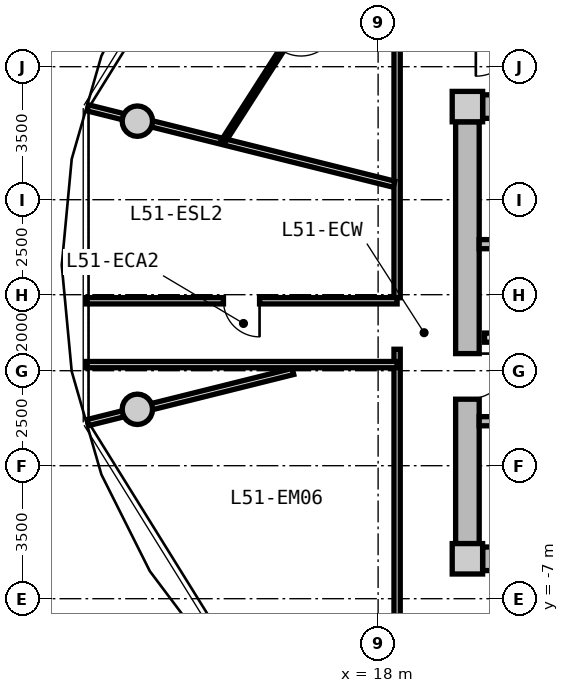
"""IFC4 building model, lengths in metres.
Left out: names, types, materials, properties, quantities, classifications, styles, units other than length and angle.
Written with IfcOpenShell. Run it as: python <this file> out.ifc"""

import sys

from ifc_helpers import new_model, si_unit, direction, frame, frame_2d, origin, origin_2d, place, context, subcontext, project, spatial, rectangle, circle, extrude, source, transform, mapped, element, fill, save


model = new_model("IFC4")
c1 = context("Model", 3, precision=1e-05, world=origin(), true_north=direction((0.0, 1.0)))
c2 = subcontext(c1, "Body", "Model", "MODEL_VIEW")
j1 = project(units=[si_unit("LENGTHUNIT", "METRE"), si_unit("PLANEANGLEUNIT", "RADIAN")], contexts=[c1])
p1 = place(None, origin())
s1 = spatial("IfcSite", under=j1, at=p1, CompositionType="ELEMENT")
p2 = place(p1, origin())
s2 = spatial("IfcBuilding", under=s1, at=p2, CompositionType="ELEMENT")
p3 = place(p2, frame((0.0, 0.0, 164.8)))
s3 = spatial("IfcBuildingStorey", under=s2, at=p3, CompositionType="ELEMENT", Elevation=164.8)
m1 = source(origin(), c2, "Body", "SweptSolid", [
    extrude(rectangle(XDim=0.8, YDim=0.8, at=origin_2d()), origin(), (0.0, 0.0, 1.0), 3.05),
])
for number, where, z_axis, x_axis in (
    (1, (20.35, -5.95, 0.0), (0.0, 0.0, 1.0), (1.0, 0.0, 0.0)),
    (2, (20.35, 5.95, 0.0), (0.0, 0.0, 1.0), (1.0, 0.0, 0.0)),
):
    element("IfcColumn", number, at=place(p3, frame(where, z_axis=z_axis, x_axis=x_axis)), inside=s3, PredefinedType="COLUMN", context=c2, shape_type="MappedRepresentation", body=[
        mapped(m1, transform((0.0, 0.0, 0.0), x_axis=(1.0, 0.0, 0.0), y_axis=(0.0, 1.0, 0.0), z_axis=(0.0, 0.0, 1.0), scale=1.0)),
    ])
m2 = source(origin(), c2, "Body", "SweptSolid", [
    extrude(rectangle(XDim=14.5, YDim=0.62, at=frame_2d((7.25, 0.0))), origin(), (0.0, 0.0, 1.0), 2.81),
])
for number, where, z_axis, x_axis in (
    (3, (20.75, 5.95, 0.0), (0.0, 0.0, 1.0), (1.0, 0.0, 0.0)),
    (4, (35.25, -5.95, 0.0), (0.0, 0.0, 1.0), (-1.0, 0.0, 0.0)),
):
    element("IfcWall", number, at=place(p3, frame(where, z_axis=z_axis, x_axis=x_axis)), inside=s3, PredefinedType="SHEAR", context=c2, shape_type="MappedRepresentation", body=[
        mapped(m2, transform((0.0, 0.0, 0.0), x_axis=(1.0, 0.0, 0.0), y_axis=(0.0, 1.0, 0.0), z_axis=(0.0, 0.0, 1.0), scale=1.0)),
    ])
m3 = source(origin(), c2, "Body", "SweptSolid", [
    extrude(rectangle(XDim=11.1, YDim=0.62, at=frame_2d((5.55, 0.0))), origin(), (0.0, 0.0, 1.0), 2.81),
])
p4 = place(p3, frame((20.35, -5.55, 0.0), z_axis=(0.0, 0.0, 1.0), x_axis=(0.0, 1.0, 0.0)))
e5 = element("IfcWall", 5, at=p4, inside=s3, PredefinedType="SHEAR", context=c2, shape_type="MappedRepresentation", body=[
    mapped(m3, transform((0.0, 0.0, 0.0), x_axis=(1.0, 0.0, 0.0), y_axis=(0.0, 1.0, 0.0), z_axis=(0.0, 0.0, 1.0), scale=1.0)),
])
p5 = place(p4, frame((3.8, 0.0, 0.0)))
e6 = element("IfcOpeningElement", 6, at=p5, cuts=e5, PredefinedType="OPENING", context=c2, shape_type="SweptSolid", body=[
    extrude(rectangle(XDim=1.2, YDim=2.15, at=frame_2d((0.6, 1.075))), frame((0.0, 0.32, 0.0), z_axis=(0.0, -1.0, 0.0), x_axis=(1.0, 0.0, 0.0)), (0.0, 0.0, 1.0), 0.64),
])
m4 = source(origin(), c2, "Body", "SweptSolid", [
    extrude(circle(Radius=0.4, at=origin_2d()), origin(), (0.0, 0.0, 1.0), 3.05),
])
for number, where, z_axis, x_axis in (
    (7, (11.665, 5.567, 0.0), (0.0, 0.0, 1.0), (1.0, 0.0, 0.0)),
    (8, (11.665, -2.016, 0.0), (0.0, 0.0, 1.0), (1.0, 0.0, 0.0)),
):
    element("IfcColumn", number, at=place(p3, frame(where, z_axis=z_axis, x_axis=x_axis)), inside=s3, PredefinedType="COLUMN", context=c2, shape_type="MappedRepresentation", body=[
        mapped(m4, transform((0.0, 0.0, 0.0), x_axis=(1.0, 0.0, 0.0), y_axis=(0.0, 1.0, 0.0), z_axis=(0.0, 0.0, 1.0), scale=1.0)),
    ])
m5 = source(origin(), c2, "Body", "SweptSolid", [
    extrude(rectangle(XDim=7.88, YDim=0.24, at=frame_2d((3.94, 0.0))), origin(), (0.0, 0.0, 1.0), 2.81),
])
p6 = place(p3, frame((20.66, 2.33, 0.0), z_axis=(0.0, 0.0, 1.0), x_axis=(1.0, 0.0, 0.0)))
e9 = element("IfcWall", 9, at=p6, inside=s3, PredefinedType="PARTITIONING", context=c2, shape_type="MappedRepresentation", body=[
    mapped(m5, transform((0.0, 0.0, 0.0), x_axis=(1.0, 0.0, 0.0), y_axis=(0.0, 1.0, 0.0), z_axis=(0.0, 0.0, 1.0), scale=1.0)),
])
p7 = place(p3, frame((20.66, -2.33, 0.0), z_axis=(0.0, 0.0, 1.0), x_axis=(1.0, 0.0, 0.0)))
e10 = element("IfcWall", 10, at=p7, inside=s3, PredefinedType="PARTITIONING", context=c2, shape_type="MappedRepresentation", body=[
    mapped(m5, transform((0.0, 0.0, 0.0), x_axis=(1.0, 0.0, 0.0), y_axis=(0.0, 1.0, 0.0), z_axis=(0.0, 0.0, 1.0), scale=1.0)),
])
p8 = place(p7, frame((1.0, 0.0, 0.0)))
e11 = element("IfcOpeningElement", 11, at=p8, cuts=e10, PredefinedType="OPENING", context=c2, shape_type="SweptSolid", body=[
    extrude(rectangle(XDim=1.1, YDim=2.15, at=frame_2d((0.55, 1.075))), frame((0.0, 0.13, 0.0), z_axis=(0.0, -1.0, 0.0), x_axis=(1.0, 0.0, 0.0)), (0.0, 0.0, 1.0), 0.26),
])
m6 = source(origin(), c2, "Body", "SweptSolid", [
    extrude(rectangle(XDim=7.62, YDim=0.24, at=frame_2d((3.81, 0.0))), origin(), (0.0, 0.0, 1.0), 2.795),
])
p9 = place(p3, frame((20.8, -0.13, 0.0), z_axis=(0.0, 0.0, 1.0), x_axis=(1.0, 0.0, 0.0)))
e12 = element("IfcWall", 12, at=p9, inside=s3, PredefinedType="PARTITIONING", context=c2, shape_type="MappedRepresentation", body=[
    mapped(m6, transform((0.0, 0.0, 0.0), x_axis=(1.0, 0.0, 0.0), y_axis=(0.0, 1.0, 0.0), z_axis=(0.0, 0.0, 1.0), scale=1.0)),
])
p10 = place(p9, frame((6.22, 0.0, 0.0)))
e13 = element("IfcOpeningElement", 13, at=p10, cuts=e12, PredefinedType="OPENING", context=c2, shape_type="SweptSolid", body=[
    extrude(rectangle(XDim=1.0, YDim=2.1, at=frame_2d((0.5, 1.05))), frame((0.0, 0.13, 0.0), z_axis=(0.0, -1.0, 0.0), x_axis=(1.0, 0.0, 0.0)), (0.0, 0.0, 1.0), 0.26),
])
p11 = place(p9, frame((2.4, 0.0, 0.0)))
e14 = element("IfcOpeningElement", 14, at=p11, cuts=e12, PredefinedType="OPENING", context=c2, shape_type="SweptSolid", body=[
    extrude(rectangle(XDim=1.0, YDim=2.1, at=frame_2d((0.5, 1.05))), frame((0.0, 0.13, 0.0), z_axis=(0.0, -1.0, 0.0), x_axis=(1.0, 0.0, 0.0)), (0.0, 0.0, 1.0), 0.26),
])
m7 = source(origin(), c2, "Body", "SweptSolid", [
    extrude(rectangle(XDim=7.365, YDim=0.165, at=frame_2d((3.682, 0.0))), origin(), (0.0, 0.0, 1.0), 2.795),
])
p12 = place(p3, frame((18.5, -7.8, 0.0), z_axis=(0.0, 0.0, 1.0), x_axis=(0.0, 1.0, 0.0)))
e15 = element("IfcWall", 15, at=p12, inside=s3, PredefinedType="PARTITIONING", context=c2, shape_type="MappedRepresentation", body=[
    mapped(m7, transform((0.0, 0.0, 0.0), x_axis=(1.0, 0.0, 0.0), y_axis=(0.0, 1.0, 0.0), z_axis=(0.0, 0.0, 1.0), scale=1.0)),
])
m8 = source(origin(), c2, "Body", "SweptSolid", [
    extrude(rectangle(XDim=6.88, YDim=0.165, at=frame_2d((3.44, 0.0))), origin(), (0.0, 0.0, 1.0), 2.795),
])
p13 = place(p3, frame((18.5, 0.92, 0.0), z_axis=(0.0, 0.0, 1.0), x_axis=(0.0, 1.0, 0.0)))
e16 = element("IfcWall", 16, at=p13, inside=s3, PredefinedType="PARTITIONING", context=c2, shape_type="MappedRepresentation", body=[
    mapped(m8, transform((0.0, 0.0, 0.0), x_axis=(1.0, 0.0, 0.0), y_axis=(0.0, 1.0, 0.0), z_axis=(0.0, 0.0, 1.0), scale=1.0)),
])
m9 = source(origin(), c2, "Body", "SweptSolid", [
    extrude(rectangle(XDim=8.305, YDim=0.165, at=frame_2d((4.153, 0.0))), origin(), (0.0, 0.0, 1.0), 2.345),
])
p14 = place(p3, frame((18.42, 3.908, 0.0), z_axis=(0.0, 0.0, 1.0), x_axis=(-0.970309994378, 0.241864662175, 0.0)))
e17 = element("IfcWall", 17, at=p14, inside=s3, PredefinedType="PARTITIONING", context=c2, shape_type="MappedRepresentation", body=[
    mapped(m9, transform((0.0, 0.0, 0.0), x_axis=(1.0, 0.0, 0.0), y_axis=(0.0, 1.0, 0.0), z_axis=(0.0, 0.0, 1.0), scale=1.0)),
])
m10 = source(origin(), c2, "Body", "SweptSolid", [
    extrude(rectangle(XDim=5.564, YDim=0.165, at=frame_2d((2.782, 0.0))), origin(), (0.0, 0.0, 1.0), 2.345),
])
p15 = place(p3, frame((15.76, -1.02, 0.0), z_axis=(0.0, 0.0, 1.0), x_axis=(-0.970315176167, -0.241843872984, 0.0)))
e18 = element("IfcWall", 18, at=p15, inside=s3, PredefinedType="PARTITIONING", context=c2, shape_type="MappedRepresentation", body=[
    mapped(m10, transform((0.0, 0.0, 0.0), x_axis=(1.0, 0.0, 0.0), y_axis=(0.0, 1.0, 0.0), z_axis=(0.0, 0.0, 1.0), scale=1.0)),
])
m11 = source(origin(), c2, "Body", "SweptSolid", [
    extrude(rectangle(XDim=8.189, YDim=0.165, at=frame_2d((4.094, 0.0))), origin(), (0.0, 0.0, 1.0), 2.795),
])
p16 = place(p3, frame((10.311, 0.84, 0.0), z_axis=(0.0, 0.0, 1.0), x_axis=(1.0, 0.0, 0.0)))
e19 = element("IfcWall", 19, at=p16, inside=s3, PredefinedType="PARTITIONING", context=c2, shape_type="MappedRepresentation", body=[
    mapped(m11, transform((0.0, 0.0, 0.0), x_axis=(1.0, 0.0, 0.0), y_axis=(0.0, 1.0, 0.0), z_axis=(0.0, 0.0, 1.0), scale=1.0)),
])
p17 = place(p16, frame((3.619, 0.0, 0.0)))
e20 = element("IfcOpeningElement", 20, at=p17, cuts=e19, PredefinedType="OPENING", context=c2, shape_type="SweptSolid", body=[
    extrude(rectangle(XDim=0.95, YDim=2.1, at=frame_2d((0.475, 1.05))), frame((0.0, 0.093, 0.0), z_axis=(0.0, -1.0, 0.0), x_axis=(1.0, 0.0, 0.0)), (0.0, 0.0, 1.0), 0.185),
])
p18 = place(p3, frame((18.5, -0.84, 0.0), z_axis=(0.0, 0.0, 1.0), x_axis=(-1.0, 0.0, 0.0)))
e21 = element("IfcWall", 21, at=p18, inside=s3, PredefinedType="PARTITIONING", context=c2, shape_type="MappedRepresentation", body=[
    mapped(m11, transform((0.0, 0.0, 0.0), x_axis=(1.0, 0.0, 0.0), y_axis=(0.0, 1.0, 0.0), z_axis=(0.0, 0.0, 1.0), scale=1.0)),
])
m12 = source(origin(), c2, "Body", "SweptSolid", [
    extrude(rectangle(XDim=6.654, YDim=0.115, at=frame_2d((3.327, 0.0))), origin(), (0.0, 0.0, 1.0), 2.795),
])
p19 = place(p3, frame((17.509, 10.632, 0.0), z_axis=(0.0, 0.0, 1.0), x_axis=(-0.53923796816, -0.842153438332, 0.0)))
e22 = element("IfcWall", 22, at=p19, inside=s3, PredefinedType="PARTITIONING", context=c2, shape_type="MappedRepresentation", body=[
    mapped(m12, transform((0.0, 0.0, 0.0), x_axis=(1.0, 0.0, 0.0), y_axis=(0.0, 1.0, 0.0), z_axis=(0.0, 0.0, 1.0), scale=1.0)),
])
p20 = place(p19, frame((2.852, 0.0, 0.0)))
e23 = element("IfcOpeningElement", 23, at=p20, cuts=e22, PredefinedType="OPENING", context=c2, shape_type="SweptSolid", body=[
    extrude(rectangle(XDim=0.95, YDim=2.1, at=frame_2d((0.475, 1.05))), frame((0.0, 0.067, 0.0), z_axis=(0.0, -1.0, 0.0), x_axis=(1.0, 0.0, 0.0)), (0.0, 0.0, 1.0), 0.135),
])
m13 = source(origin(), c2, "Body", "SweptSolid", [
    extrude(rectangle(XDim=1.2, YDim=2.15, at=frame_2d((0.6, 1.075))), frame((0.0, 0.025, 0.0), z_axis=(0.0, -1.0, 0.0), x_axis=(1.0, 0.0, 0.0)), (0.0, 0.0, 1.0), 0.05),
])
p21 = place(p5, frame((1.2, 0.0, 0.0), z_axis=(0.0, 0.0, 1.0), x_axis=(-1.0, 0.0, 0.0)))
e24 = element("IfcDoor", 24, at=p21, inside=s3, OperationType="SINGLE_SWING_LEFT", PredefinedType="DOOR", context=c2, shape_type="MappedRepresentation", body=[
    mapped(m13, transform((0.0, 0.0, 0.0), x_axis=(1.0, 0.0, 0.0), y_axis=(0.0, 1.0, 0.0), z_axis=(0.0, 0.0, 1.0), scale=1.0)),
])
fill(e6, e24)
m14 = source(origin(), c2, "Body", "SweptSolid", [
    extrude(rectangle(XDim=0.95, YDim=2.1, at=frame_2d((0.475, 1.05))), frame((0.0, 0.025, 0.0), z_axis=(0.0, -1.0, 0.0), x_axis=(1.0, 0.0, 0.0)), (0.0, 0.0, 1.0), 0.05),
])
p22 = place(p17, frame((0.95, 0.0, 0.0), z_axis=(0.0, 0.0, 1.0), x_axis=(-1.0, 0.0, 0.0)))
e25 = element("IfcDoor", 25, at=p22, inside=s3, OperationType="SINGLE_SWING_LEFT", PredefinedType="DOOR", context=c2, shape_type="MappedRepresentation", body=[
    mapped(m14, transform((0.0, 0.0, 0.0), x_axis=(1.0, 0.0, 0.0), y_axis=(0.0, 1.0, 0.0), z_axis=(0.0, 0.0, 1.0), scale=1.0)),
])
fill(e20, e25)
save(model, sys.argv[1])
